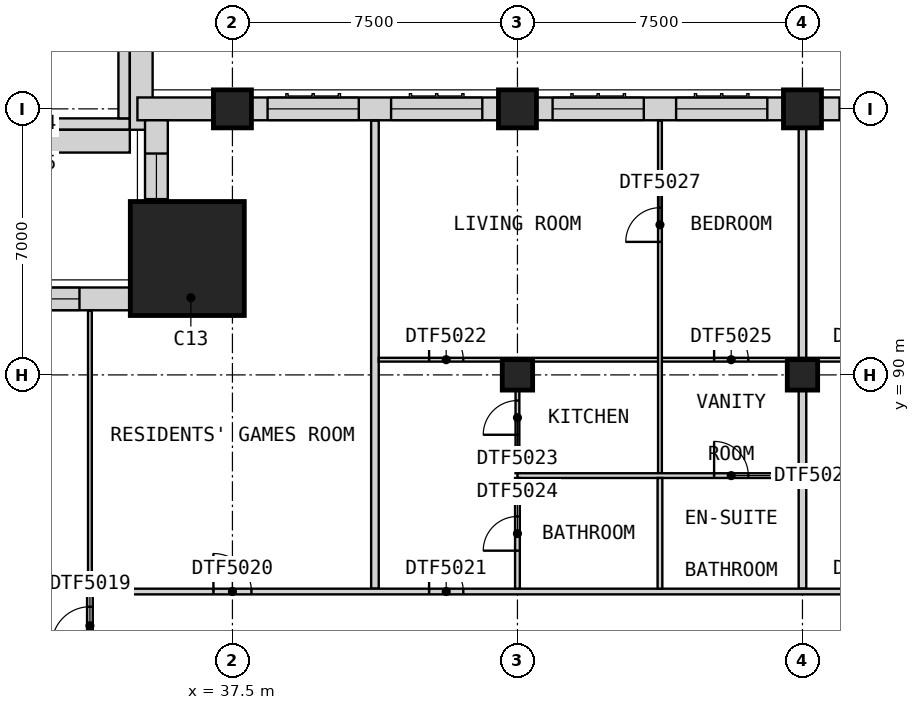
"""IFC4 building model, lengths in metres.
Left out: names, types, materials, properties, quantities, classifications, styles, units other than length and angle.
Written with IfcOpenShell. Run it as: python <this file> out.ifc"""

import sys

from ifc_helpers import new_model, si_unit, direction, frame, frame_2d, origin, origin_2d, place, context, subcontext, project, spatial, rectangle, extrude, element, fill, save


model = new_model("IFC4")
c1 = context("Model", 3, precision=1e-05, world=origin(), true_north=direction((0.0, 1.0)))
c2 = subcontext(c1, "Body", "Model", "MODEL_VIEW")
j1 = project(units=[si_unit("LENGTHUNIT", "METRE"), si_unit("PLANEANGLEUNIT", "RADIAN")], contexts=[c1])
p1 = place(None, origin())
s1 = spatial("IfcSite", under=j1, at=p1, CompositionType="ELEMENT")
p2 = place(p1, origin())
s2 = spatial("IfcBuilding", under=s1, at=p2, CompositionType="ELEMENT")
p3 = place(p2, frame((0.0, 0.0, 219.7)))
s3 = spatial("IfcBuildingStorey", under=s2, at=p3, CompositionType="ELEMENT", Elevation=219.7)
p4 = place(p3, frame((37.5, 97.0, 0.0), z_axis=(0.0, 0.0, 1.0), x_axis=(1.0, 0.0, 0.0)))
e1 = element("IfcColumn", 1, at=p4, inside=s3, PredefinedType="COLUMN", context=c2, shape_type="SweptSolid", body=[
    extrude(rectangle(XDim=1.0, YDim=1.0, at=origin_2d()), origin(), (0.0, 0.0, 1.0), 3.5),
])
p5 = place(p3, frame((45.0, 90.0, 0.0), z_axis=(0.0, 0.0, 1.0), x_axis=(1.0, 0.0, 0.0)))
e2 = element("IfcColumn", 2, at=p5, inside=s3, PredefinedType="COLUMN", context=c2, shape_type="SweptSolid", body=[
    extrude(rectangle(XDim=0.8, YDim=0.8, at=origin_2d()), origin(), (0.0, 0.0, 1.0), 3.5),
])
p6 = place(p3, frame((45.0, 97.0, 0.0), z_axis=(0.0, 0.0, 1.0), x_axis=(1.0, 0.0, 0.0)))
e3 = element("IfcColumn", 3, at=p6, inside=s3, PredefinedType="COLUMN", context=c2, shape_type="SweptSolid", body=[
    extrude(rectangle(XDim=1.0, YDim=1.0, at=origin_2d()), origin(), (0.0, 0.0, 1.0), 3.5),
])
p7 = place(p3, frame((52.5, 90.0, 0.0), z_axis=(0.0, 0.0, 1.0), x_axis=(1.0, 0.0, 0.0)))
e4 = element("IfcColumn", 4, at=p7, inside=s3, PredefinedType="COLUMN", context=c2, shape_type="SweptSolid", body=[
    extrude(rectangle(XDim=0.8, YDim=0.8, at=origin_2d()), origin(), (0.0, 0.0, 1.0), 3.5),
])
p8 = place(p3, frame((52.5, 97.0, 0.0), z_axis=(0.0, 0.0, 1.0), x_axis=(1.0, 0.0, 0.0)))
e5 = element("IfcColumn", 5, at=p8, inside=s3, PredefinedType="COLUMN", context=c2, shape_type="SweptSolid", body=[
    extrude(rectangle(XDim=1.0, YDim=1.0, at=origin_2d()), origin(), (0.0, 0.0, 1.0), 3.5),
])
p9 = place(p3, frame((36.312, 93.062, 0.0), z_axis=(0.0, 0.0, 1.0), x_axis=(0.0, -1.0, 0.0)))
e6 = element("IfcColumn", 6, at=p9, inside=s3, PredefinedType="COLUMN", context=c2, shape_type="SweptSolid", body=[
    extrude(rectangle(XDim=3.0, YDim=3.0, at=origin_2d()), origin(), (0.507, 0.046, 0.861), 4.067),
])
p10 = place(p3, frame((30.0, 96.6, 0.0), z_axis=(0.0, 0.0, 1.0), x_axis=(1.0, 0.0, 0.0)))
e7 = element("IfcWall", 7, at=p10, inside=s3, PredefinedType="PARAPET", context=c2, shape_type="SweptSolid", body=[
    extrude(rectangle(XDim=4.8, YDim=0.3, at=frame_2d((2.4, 0.0))), origin(), (0.0, 0.0, 1.0), 1.2),
])
p11 = place(p3, frame((30.0, 96.15, 0.0), z_axis=(0.0, 0.0, 1.0), x_axis=(1.0, 0.0, 0.0)))
e8 = element("IfcWall", 8, at=p11, inside=s3, PredefinedType="STANDARD", context=c2, shape_type="SweptSolid", body=[
    extrude(rectangle(XDim=4.8, YDim=0.6, at=frame_2d((2.4, 0.0))), origin(), (0.0, 0.0, 1.0), 0.6),
])
p12 = place(p3, frame((34.65, 96.75, 0.0), z_axis=(0.0, 0.0, 1.0), x_axis=(0.0, 1.0, 0.0)))
e9 = element("IfcWall", 9, at=p12, inside=s3, PredefinedType="PARAPET", context=c2, shape_type="SweptSolid", body=[
    extrude(rectangle(XDim=4.5, YDim=0.3, at=frame_2d((2.25, 0.0))), origin(), (0.0, 0.0, 1.0), 1.2),
])
p13 = place(p3, frame((35.1, 96.45, 0.0), z_axis=(0.0, 0.0, 1.0), x_axis=(0.0, 1.0, 0.0)))
e10 = element("IfcWall", 10, at=p13, inside=s3, PredefinedType="STANDARD", context=c2, shape_type="SweptSolid", body=[
    extrude(rectangle(XDim=4.8, YDim=0.6, at=frame_2d((2.4, 0.0))), origin(), (0.0, 0.0, 1.0), 0.6),
])
p14 = place(p3, frame((59.5, 97.0, 0.0), z_axis=(0.0, 0.0, 1.0), x_axis=(-1.0, 0.0, 0.0)))
e11 = element("IfcWall", 11, at=p14, inside=s3, PredefinedType="SOLIDWALL", context=c2, shape_type="SweptSolid", body=[
    extrude(rectangle(XDim=6.5, YDim=0.6, at=frame_2d((3.25, 0.0))), origin(), (0.0, 0.0, 1.0), 2.75),
])
p15 = place(p14, frame((4.225, 0.0, 0.0)))
e12 = element("IfcOpeningElement", 12, at=p15, cuts=e11, PredefinedType="OPENING", context=c2, shape_type="SweptSolid", body=[
    extrude(rectangle(XDim=1.8, YDim=2.4, at=frame_2d((0.9, 1.2))), frame((0.0, 0.31, 0.0), z_axis=(0.0, -1.0, 0.0), x_axis=(1.0, 0.0, 0.0)), (0.0, 0.0, 1.0), 0.62),
])
p16 = place(p14, frame((0.425, 0.0, 0.8)))
e13 = element("IfcOpeningElement", 13, at=p16, cuts=e11, PredefinedType="OPENING", context=c2, shape_type="SweptSolid", body=[
    extrude(rectangle(XDim=2.4, YDim=1.8, at=frame_2d((1.2, 0.9))), frame((0.0, 0.31, 0.0), z_axis=(0.0, -1.0, 0.0), x_axis=(1.0, 0.0, 0.0)), (0.0, 0.0, 1.0), 0.62),
])
p17 = place(p3, frame((52.0, 97.0, 0.0), z_axis=(0.0, 0.0, 1.0), x_axis=(-1.0, 0.0, 0.0)))
e14 = element("IfcWall", 14, at=p17, inside=s3, PredefinedType="SOLIDWALL", context=c2, shape_type="SweptSolid", body=[
    extrude(rectangle(XDim=6.5, YDim=0.6, at=frame_2d((3.25, 0.0))), origin(), (0.0, 0.0, 1.0), 2.75),
])
p18 = place(p17, frame((3.675, 0.0, 0.8)))
e15 = element("IfcOpeningElement", 15, at=p18, cuts=e14, PredefinedType="OPENING", context=c2, shape_type="SweptSolid", body=[
    extrude(rectangle(XDim=2.4, YDim=1.8, at=frame_2d((1.2, 0.9))), frame((0.0, 0.31, 0.0), z_axis=(0.0, -1.0, 0.0), x_axis=(1.0, 0.0, 0.0)), (0.0, 0.0, 1.0), 0.62),
])
p19 = place(p17, frame((0.425, 0.0, 0.8)))
e16 = element("IfcOpeningElement", 16, at=p19, cuts=e14, PredefinedType="OPENING", context=c2, shape_type="SweptSolid", body=[
    extrude(rectangle(XDim=2.4, YDim=1.8, at=frame_2d((1.2, 0.9))), frame((0.0, 0.31, 0.0), z_axis=(0.0, -1.0, 0.0), x_axis=(1.0, 0.0, 0.0)), (0.0, 0.0, 1.0), 0.62),
])
p20 = place(p3, frame((44.5, 97.0, 0.0), z_axis=(0.0, 0.0, 1.0), x_axis=(-1.0, 0.0, 0.0)))
e17 = element("IfcWall", 17, at=p20, inside=s3, PredefinedType="SOLIDWALL", context=c2, shape_type="SweptSolid", body=[
    extrude(rectangle(XDim=6.5, YDim=0.6, at=frame_2d((3.25, 0.0))), origin(), (0.0, 0.0, 1.0), 2.75),
])
p21 = place(p20, frame((3.675, 0.0, 0.8)))
e18 = element("IfcOpeningElement", 18, at=p21, cuts=e17, PredefinedType="OPENING", context=c2, shape_type="SweptSolid", body=[
    extrude(rectangle(XDim=2.4, YDim=1.8, at=frame_2d((1.2, 0.9))), frame((0.0, 0.31, 0.0), z_axis=(0.0, -1.0, 0.0), x_axis=(1.0, 0.0, 0.0)), (0.0, 0.0, 1.0), 0.62),
])
p22 = place(p20, frame((0.425, 0.0, 0.8)))
e19 = element("IfcOpeningElement", 19, at=p22, cuts=e17, PredefinedType="OPENING", context=c2, shape_type="SweptSolid", body=[
    extrude(rectangle(XDim=2.4, YDim=1.8, at=frame_2d((1.2, 0.9))), frame((0.0, 0.31, 0.0), z_axis=(0.0, -1.0, 0.0), x_axis=(1.0, 0.0, 0.0)), (0.0, 0.0, 1.0), 0.62),
])
p23 = place(p3, frame((37.0, 97.0, 0.0), z_axis=(0.0, 0.0, 1.0), x_axis=(-1.0, 0.0, 0.0)))
e20 = element("IfcWall", 20, at=p23, inside=s3, PredefinedType="SOLIDWALL", context=c2, shape_type="SweptSolid", body=[
    extrude(rectangle(XDim=2.0, YDim=0.6, at=frame_2d((1.0, 0.0))), origin(), (0.0, 0.0, 1.0), 3.25),
])
p24 = place(p3, frame((35.5, 96.7, 0.0), z_axis=(0.0, 0.0, 1.0), x_axis=(0.0, -1.0, 0.0)))
e21 = element("IfcWall", 21, at=p24, inside=s3, PredefinedType="SOLIDWALL", context=c2, shape_type="SweptSolid", body=[
    extrude(rectangle(XDim=3.169, YDim=0.6, at=frame_2d((1.584, 0.0))), origin(), (0.0, 0.0, 1.0), 3.25),
])
p25 = place(p24, frame((0.875, 0.0, 0.8)))
e22 = element("IfcOpeningElement", 22, at=p25, cuts=e21, PredefinedType="OPENING", context=c2, shape_type="SweptSolid", body=[
    extrude(rectangle(XDim=1.2, YDim=1.8, at=frame_2d((0.6, 0.9))), frame((0.0, 0.31, 0.0), z_axis=(0.0, -1.0, 0.0), x_axis=(1.0, 0.0, 0.0)), (0.0, 0.0, 1.0), 0.62),
])
p26 = place(p3, frame((34.906, 92.0, 0.0), z_axis=(0.0, 0.0, 1.0), x_axis=(-1.0, 0.0, 0.0)))
e23 = element("IfcWall", 23, at=p26, inside=s3, PredefinedType="SOLIDWALL", context=c2, shape_type="SweptSolid", body=[
    extrude(rectangle(XDim=4.106, YDim=0.6, at=frame_2d((2.053, 0.0))), origin(), (0.0, 0.0, 1.0), 3.25),
])
p27 = place(p26, frame((1.431, 0.0, 0.8)))
e24 = element("IfcOpeningElement", 24, at=p27, cuts=e23, PredefinedType="OPENING", context=c2, shape_type="SweptSolid", body=[
    extrude(rectangle(XDim=2.4, YDim=1.8, at=frame_2d((1.2, 0.9))), frame((0.0, 0.31, 0.0), z_axis=(0.0, -1.0, 0.0), x_axis=(1.0, 0.0, 0.0)), (0.0, 0.0, 1.0), 0.62),
])
p28 = place(p3, frame((41.25, 84.375, 0.0), z_axis=(0.0, 0.0, 1.0), x_axis=(0.0, 1.0, 0.0)))
e25 = element("IfcWall", 25, at=p28, inside=s3, PredefinedType="PARTITIONING", context=c2, shape_type="SweptSolid", body=[
    extrude(rectangle(XDim=12.315, YDim=0.2, at=frame_2d((6.157, 0.0))), origin(), (0.0, 0.0, 1.0), 3.25),
])
p29 = place(p3, frame((52.5, 84.375, 0.0), z_axis=(0.0, 0.0, 1.0), x_axis=(0.0, 1.0, 0.0)))
e26 = element("IfcWall", 26, at=p29, inside=s3, PredefinedType="PARTITIONING", context=c2, shape_type="SweptSolid", body=[
    extrude(rectangle(XDim=13.125, YDim=0.2, at=frame_2d((6.562, 0.0))), origin(), (0.0, 0.0, 1.0), 3.25),
])
p30 = place(p3, frame((33.75, 84.3, 0.0), z_axis=(0.0, 0.0, 1.0), x_axis=(1.0, 0.0, 0.0)))
e27 = element("IfcWall", 27, at=p30, inside=s3, PredefinedType="PARTITIONING", context=c2, shape_type="SweptSolid", body=[
    extrude(rectangle(XDim=28.05, YDim=0.15, at=frame_2d((14.025, 0.0))), origin(), (0.0, 0.0, 1.0), 3.25),
])
p31 = place(p30, frame((3.25, 0.0, 0.0)))
e28 = element("IfcOpeningElement", 28, at=p31, cuts=e27, PredefinedType="OPENING", context=c2, shape_type="SweptSolid", body=[
    extrude(rectangle(XDim=1.0, YDim=2.1, at=frame_2d((0.5, 1.05))), frame((0.0, 0.085, 0.0), z_axis=(0.0, -1.0, 0.0), x_axis=(1.0, 0.0, 0.0)), (0.0, 0.0, 1.0), 0.17),
])
p32 = place(p30, frame((8.925, 0.0, 0.0)))
e29 = element("IfcOpeningElement", 29, at=p32, cuts=e27, PredefinedType="OPENING", context=c2, shape_type="SweptSolid", body=[
    extrude(rectangle(XDim=0.9, YDim=2.1, at=frame_2d((0.45, 1.05))), frame((0.0, 0.085, 0.0), z_axis=(0.0, -1.0, 0.0), x_axis=(1.0, 0.0, 0.0)), (0.0, 0.0, 1.0), 0.17),
])
p33 = place(p30, frame((20.175, 0.0, 0.0)))
e30 = element("IfcOpeningElement", 30, at=p33, cuts=e27, PredefinedType="OPENING", context=c2, shape_type="SweptSolid", body=[
    extrude(rectangle(XDim=0.9, YDim=2.1, at=frame_2d((0.45, 1.05))), frame((0.0, 0.085, 0.0), z_axis=(0.0, -1.0, 0.0), x_axis=(1.0, 0.0, 0.0)), (0.0, 0.0, 1.0), 0.17),
])
p34 = place(p30, frame((26.65, 0.0, 0.0)))
e31 = element("IfcOpeningElement", 31, at=p34, cuts=e27, PredefinedType="OPENING", context=c2, shape_type="SweptSolid", body=[
    extrude(rectangle(XDim=1.0, YDim=2.1, at=frame_2d((0.5, 1.05))), frame((0.0, 0.085, 0.0), z_axis=(0.0, -1.0, 0.0), x_axis=(1.0, 0.0, 0.0)), (0.0, 0.0, 1.0), 0.17),
])
p35 = place(p3, frame((33.75, 82.5, 0.0), z_axis=(0.0, 0.0, 1.0), x_axis=(0.0, 1.0, 0.0)))
e32 = element("IfcWall", 32, at=p35, inside=s3, PredefinedType="PARTITIONING", context=c2, shape_type="SweptSolid", body=[
    extrude(rectangle(XDim=1.725, YDim=0.15, at=frame_2d((0.863, 0.0))), origin(), (0.0, 0.0, 1.0), 3.25),
])
p36 = place(p35, frame((0.4, 0.0, 0.0)))
e33 = element("IfcOpeningElement", 33, at=p36, cuts=e32, PredefinedType="OPENING", context=c2, shape_type="SweptSolid", body=[
    extrude(rectangle(XDim=1.0, YDim=2.1, at=frame_2d((0.5, 1.05))), frame((0.0, 0.085, 0.0), z_axis=(0.0, -1.0, 0.0), x_axis=(1.0, 0.0, 0.0)), (0.0, 0.0, 1.0), 0.17),
])
p37 = place(p3, frame((41.35, 90.4, 0.0), z_axis=(0.0, 0.0, 1.0), x_axis=(1.0, 0.0, 0.0)))
e34 = element("IfcWall", 34, at=p37, inside=s3, PredefinedType="PARTITIONING", context=c2, shape_type="SweptSolid", body=[
    extrude(rectangle(XDim=18.55, YDim=0.1, at=frame_2d((9.275, 0.0))), origin(), (0.0, 0.0, 1.0), 3.25),
])
p38 = place(p37, frame((1.325, 0.0, 0.0)))
e35 = element("IfcOpeningElement", 35, at=p38, cuts=e34, PredefinedType="OPENING", context=c2, shape_type="SweptSolid", body=[
    extrude(rectangle(XDim=0.9, YDim=2.1, at=frame_2d((0.45, 1.05))), frame((0.0, 0.06, 0.0), z_axis=(0.0, -1.0, 0.0), x_axis=(1.0, 0.0, 0.0)), (0.0, 0.0, 1.0), 0.12),
])
p39 = place(p37, frame((8.825, 0.0, 0.0)))
e36 = element("IfcOpeningElement", 36, at=p39, cuts=e34, PredefinedType="OPENING", context=c2, shape_type="SweptSolid", body=[
    extrude(rectangle(XDim=0.9, YDim=2.1, at=frame_2d((0.45, 1.05))), frame((0.0, 0.06, 0.0), z_axis=(0.0, -1.0, 0.0), x_axis=(1.0, 0.0, 0.0)), (0.0, 0.0, 1.0), 0.12),
])
p40 = place(p37, frame((12.575, 0.0, 0.0)))
e37 = element("IfcOpeningElement", 37, at=p40, cuts=e34, PredefinedType="OPENING", context=c2, shape_type="SweptSolid", body=[
    extrude(rectangle(XDim=0.9, YDim=2.1, at=frame_2d((0.45, 1.05))), frame((0.0, 0.06, 0.0), z_axis=(0.0, -1.0, 0.0), x_axis=(1.0, 0.0, 0.0)), (0.0, 0.0, 1.0), 0.12),
])
p41 = place(p3, frame((33.75, 84.375, 0.0), z_axis=(0.0, 0.0, 1.0), x_axis=(0.0, 1.0, 0.0)))
e38 = element("IfcWall", 38, at=p41, inside=s3, PredefinedType="PARTITIONING", context=c2, shape_type="SweptSolid", body=[
    extrude(rectangle(XDim=7.315, YDim=0.1, at=frame_2d((3.657, 0.0))), origin(), (0.0, 0.0, 1.0), 3.25),
])
p42 = place(p3, frame((45.0, 87.413, 0.0), z_axis=(0.0, 0.0, 1.0), x_axis=(0.0, 1.0, 0.0)))
e39 = element("IfcWall", 39, at=p42, inside=s3, PredefinedType="PARTITIONING", context=c2, shape_type="SweptSolid", body=[
    extrude(rectangle(XDim=2.938, YDim=0.1, at=frame_2d((1.469, 0.0))), origin(), (0.0, 0.0, 1.0), 3.25),
])
p43 = place(p42, frame((1.012, 0.0, 0.0)))
e40 = element("IfcOpeningElement", 40, at=p43, cuts=e39, PredefinedType="OPENING", context=c2, shape_type="SweptSolid", body=[
    extrude(rectangle(XDim=0.9, YDim=2.1, at=frame_2d((0.45, 1.05))), frame((0.0, 0.06, 0.0), z_axis=(0.0, -1.0, 0.0), x_axis=(1.0, 0.0, 0.0)), (0.0, 0.0, 1.0), 0.12),
])
p44 = place(p3, frame((48.75, 87.413, 0.0), z_axis=(0.0, 0.0, 1.0), x_axis=(0.0, 1.0, 0.0)))
e41 = element("IfcWall", 41, at=p44, inside=s3, PredefinedType="PARTITIONING", context=c2, shape_type="SweptSolid", body=[
    extrude(rectangle(XDim=9.277, YDim=0.1, at=frame_2d((4.639, 0.0))), origin(), (0.0, 0.0, 1.0), 3.25),
])
p45 = place(p44, frame((6.087, 0.0, 0.0)))
e42 = element("IfcOpeningElement", 42, at=p45, cuts=e41, PredefinedType="OPENING", context=c2, shape_type="SweptSolid", body=[
    extrude(rectangle(XDim=0.9, YDim=2.1, at=frame_2d((0.45, 1.05))), frame((0.0, 0.06, 0.0), z_axis=(0.0, -1.0, 0.0), x_axis=(1.0, 0.0, 0.0)), (0.0, 0.0, 1.0), 0.12),
])
p46 = place(p3, frame((45.0, 87.35, 0.0), z_axis=(0.0, 0.0, 1.0), x_axis=(1.0, 0.0, 0.0)))
e43 = element("IfcWall", 43, at=p46, inside=s3, PredefinedType="PARTITIONING", context=c2, shape_type="SweptSolid", body=[
    extrude(rectangle(XDim=7.4, YDim=0.125, at=frame_2d((3.7, 0.0))), origin(), (0.0, 0.0, 1.0), 3.25),
])
p47 = place(p46, frame((5.175, 0.0, 0.0)))
e44 = element("IfcOpeningElement", 44, at=p47, cuts=e43, PredefinedType="OPENING", context=c2, shape_type="SweptSolid", body=[
    extrude(rectangle(XDim=0.9, YDim=2.1, at=frame_2d((0.45, 1.05))), frame((0.0, 0.073, 0.0), z_axis=(0.0, -1.0, 0.0), x_axis=(1.0, 0.0, 0.0)), (0.0, 0.0, 1.0), 0.145),
])
p48 = place(p3, frame((45.0, 84.375, 0.0), z_axis=(0.0, 0.0, 1.0), x_axis=(0.0, 1.0, 0.0)))
e45 = element("IfcWall", 45, at=p48, inside=s3, PredefinedType="PARTITIONING", context=c2, shape_type="SweptSolid", body=[
    extrude(rectangle(XDim=2.913, YDim=0.125, at=frame_2d((1.456, 0.0))), origin(), (0.0, 0.0, 1.0), 3.25),
])
p49 = place(p48, frame((1.0, 0.0, 0.0)))
e46 = element("IfcOpeningElement", 46, at=p49, cuts=e45, PredefinedType="OPENING", context=c2, shape_type="SweptSolid", body=[
    extrude(rectangle(XDim=0.9, YDim=2.1, at=frame_2d((0.45, 1.05))), frame((0.0, 0.073, 0.0), z_axis=(0.0, -1.0, 0.0), x_axis=(1.0, 0.0, 0.0)), (0.0, 0.0, 1.0), 0.145),
])
p50 = place(p3, frame((48.75, 84.375, 0.0), z_axis=(0.0, 0.0, 1.0), x_axis=(0.0, 1.0, 0.0)))
e47 = element("IfcWall", 47, at=p50, inside=s3, PredefinedType="PARTITIONING", context=c2, shape_type="SweptSolid", body=[
    extrude(rectangle(XDim=2.913, YDim=0.125, at=frame_2d((1.456, 0.0))), origin(), (0.0, 0.0, 1.0), 3.25),
])
p51 = place(p15, origin())
e48 = element("IfcDoor", 48, at=p51, inside=s3, OperationType="SINGLE_SWING_LEFT", PredefinedType="DOOR", context=c2, shape_type="SweptSolid", body=[
    extrude(rectangle(XDim=1.8, YDim=2.4, at=frame_2d((0.9, 1.2))), frame((0.0, -0.075, 0.0), z_axis=(0.0, -1.0, 0.0), x_axis=(1.0, 0.0, 0.0)), (0.0, 0.0, 1.0), 0.05),
])
fill(e12, e48)
p52 = place(p18, origin())
e49 = element("IfcWindow", 49, at=p52, inside=s3, PartitioningType="SINGLE_PANEL", PredefinedType="WINDOW", context=c2, shape_type="SweptSolid", body=[
    extrude(rectangle(XDim=2.4, YDim=1.8, at=frame_2d((1.2, 0.9))), frame((0.0, -0.07, 0.0), z_axis=(0.0, -1.0, 0.0), x_axis=(1.0, 0.0, 0.0)), (0.0, 0.0, 1.0), 0.06),
])
fill(e15, e49)
p53 = place(p19, origin())
e50 = element("IfcWindow", 50, at=p53, inside=s3, PartitioningType="SINGLE_PANEL", PredefinedType="WINDOW", context=c2, shape_type="SweptSolid", body=[
    extrude(rectangle(XDim=2.4, YDim=1.8, at=frame_2d((1.2, 0.9))), frame((0.0, -0.07, 0.0), z_axis=(0.0, -1.0, 0.0), x_axis=(1.0, 0.0, 0.0)), (0.0, 0.0, 1.0), 0.06),
])
fill(e16, e50)
p54 = place(p21, origin())
e51 = element("IfcWindow", 51, at=p54, inside=s3, PartitioningType="SINGLE_PANEL", PredefinedType="WINDOW", context=c2, shape_type="SweptSolid", body=[
    extrude(rectangle(XDim=2.4, YDim=1.8, at=frame_2d((1.2, 0.9))), frame((0.0, -0.07, 0.0), z_axis=(0.0, -1.0, 0.0), x_axis=(1.0, 0.0, 0.0)), (0.0, 0.0, 1.0), 0.06),
])
fill(e18, e51)
p55 = place(p22, origin())
e52 = element("IfcWindow", 52, at=p55, inside=s3, PartitioningType="SINGLE_PANEL", PredefinedType="WINDOW", context=c2, shape_type="SweptSolid", body=[
    extrude(rectangle(XDim=2.4, YDim=1.8, at=frame_2d((1.2, 0.9))), frame((0.0, -0.07, 0.0), z_axis=(0.0, -1.0, 0.0), x_axis=(1.0, 0.0, 0.0)), (0.0, 0.0, 1.0), 0.06),
])
fill(e19, e52)
p56 = place(p25, origin())
e53 = element("IfcWindow", 53, at=p56, inside=s3, PartitioningType="SINGLE_PANEL", PredefinedType="WINDOW", context=c2, shape_type="SweptSolid", body=[
    extrude(rectangle(XDim=1.2, YDim=1.8, at=frame_2d((0.6, 0.9))), frame((0.0, -0.07, 0.0), z_axis=(0.0, -1.0, 0.0), x_axis=(1.0, 0.0, 0.0)), (0.0, 0.0, 1.0), 0.06),
])
fill(e22, e53)
p57 = place(p27, origin())
e54 = element("IfcWindow", 54, at=p57, inside=s3, PartitioningType="SINGLE_PANEL", PredefinedType="WINDOW", context=c2, shape_type="SweptSolid", body=[
    extrude(rectangle(XDim=2.4, YDim=1.8, at=frame_2d((1.2, 0.9))), frame((0.0, -0.07, 0.0), z_axis=(0.0, -1.0, 0.0), x_axis=(1.0, 0.0, 0.0)), (0.0, 0.0, 1.0), 0.06),
])
fill(e24, e54)
p58 = place(p36, origin())
e55 = element("IfcDoor", 55, at=p58, inside=s3, OperationType="SINGLE_SWING_LEFT", PredefinedType="DOOR", context=c2, shape_type="SweptSolid", body=[
    extrude(rectangle(XDim=1.0, YDim=2.1, at=frame_2d((0.5, 1.05))), frame((0.0, 0.025, 0.0), z_axis=(0.0, -1.0, 0.0), x_axis=(1.0, 0.0, 0.0)), (0.0, 0.0, 1.0), 0.05),
])
fill(e33, e55)
p59 = place(p31, origin())
e56 = element("IfcDoor", 56, at=p59, inside=s3, OperationType="SINGLE_SWING_LEFT", PredefinedType="DOOR", context=c2, shape_type="SweptSolid", body=[
    extrude(rectangle(XDim=1.0, YDim=2.1, at=frame_2d((0.5, 1.05))), frame((0.0, 0.025, 0.0), z_axis=(0.0, -1.0, 0.0), x_axis=(1.0, 0.0, 0.0)), (0.0, 0.0, 1.0), 0.05),
])
fill(e28, e56)
p60 = place(p32, origin())
e57 = element("IfcDoor", 57, at=p60, inside=s3, OperationType="SINGLE_SWING_LEFT", PredefinedType="DOOR", context=c2, shape_type="SweptSolid", body=[
    extrude(rectangle(XDim=0.9, YDim=2.1, at=frame_2d((0.45, 1.05))), frame((0.0, 0.025, 0.0), z_axis=(0.0, -1.0, 0.0), x_axis=(1.0, 0.0, 0.0)), (0.0, 0.0, 1.0), 0.05),
])
fill(e29, e57)
p61 = place(p38, origin())
e58 = element("IfcDoor", 58, at=p61, inside=s3, OperationType="SINGLE_SWING_RIGHT", PredefinedType="DOOR", context=c2, shape_type="SweptSolid", body=[
    extrude(rectangle(XDim=0.9, YDim=2.1, at=frame_2d((0.45, 1.05))), frame((0.0, 0.025, 0.0), z_axis=(0.0, -1.0, 0.0), x_axis=(1.0, 0.0, 0.0)), (0.0, 0.0, 1.0), 0.05),
])
fill(e35, e58)
p62 = place(p43, origin())
e59 = element("IfcDoor", 59, at=p62, inside=s3, OperationType="SINGLE_SWING_RIGHT", PredefinedType="DOOR", context=c2, shape_type="SweptSolid", body=[
    extrude(rectangle(XDim=0.9, YDim=2.1, at=frame_2d((0.45, 1.05))), frame((0.0, 0.025, 0.0), z_axis=(0.0, -1.0, 0.0), x_axis=(1.0, 0.0, 0.0)), (0.0, 0.0, 1.0), 0.05),
])
fill(e40, e59)
p63 = place(p49, origin())
e60 = element("IfcDoor", 60, at=p63, inside=s3, OperationType="SINGLE_SWING_LEFT", PredefinedType="DOOR", context=c2, shape_type="SweptSolid", body=[
    extrude(rectangle(XDim=0.9, YDim=2.1, at=frame_2d((0.45, 1.05))), frame((0.0, 0.025, 0.0), z_axis=(0.0, -1.0, 0.0), x_axis=(1.0, 0.0, 0.0)), (0.0, 0.0, 1.0), 0.05),
])
fill(e46, e60)
p64 = place(p39, origin())
e61 = element("IfcDoor", 61, at=p64, inside=s3, OperationType="SINGLE_SWING_RIGHT", PredefinedType="DOOR", context=c2, shape_type="SweptSolid", body=[
    extrude(rectangle(XDim=0.9, YDim=2.1, at=frame_2d((0.45, 1.05))), frame((0.0, 0.025, 0.0), z_axis=(0.0, -1.0, 0.0), x_axis=(1.0, 0.0, 0.0)), (0.0, 0.0, 1.0), 0.05),
])
fill(e36, e61)
p65 = place(p47, origin())
e62 = element("IfcDoor", 62, at=p65, inside=s3, OperationType="SINGLE_SWING_RIGHT", PredefinedType="DOOR", context=c2, shape_type="SweptSolid", body=[
    extrude(rectangle(XDim=0.9, YDim=2.1, at=frame_2d((0.45, 1.05))), frame((0.0, 0.025, 0.0), z_axis=(0.0, -1.0, 0.0), x_axis=(1.0, 0.0, 0.0)), (0.0, 0.0, 1.0), 0.05),
])
fill(e44, e62)
p66 = place(p45, origin())
e63 = element("IfcDoor", 63, at=p66, inside=s3, OperationType="SINGLE_SWING_RIGHT", PredefinedType="DOOR", context=c2, shape_type="SweptSolid", body=[
    extrude(rectangle(XDim=0.9, YDim=2.1, at=frame_2d((0.45, 1.05))), frame((0.0, 0.025, 0.0), z_axis=(0.0, -1.0, 0.0), x_axis=(1.0, 0.0, 0.0)), (0.0, 0.0, 1.0), 0.05),
])
fill(e42, e63)
save(model, sys.argv[1])
